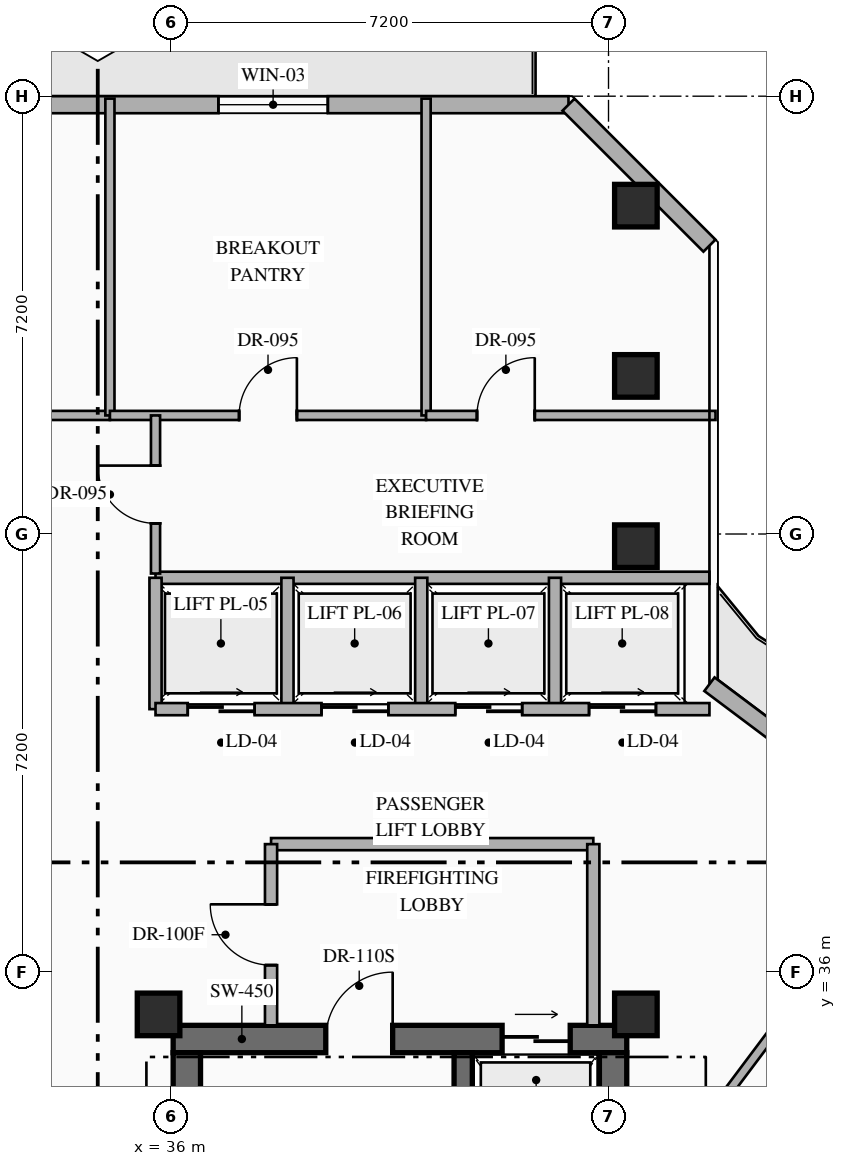
"""IFC4 building model, lengths in metres.
Left out: names, types, materials, properties, quantities, classifications, styles, units other than length and angle.
Written with IfcOpenShell. Run it as: python <this file> out.ifc"""

import sys

from ifc_helpers import new_model, si_unit, direction, frame, frame_2d, origin, origin_2d, place, context, subcontext, project, spatial, rectangle, hollow_rectangle, extrude, element, fill, save


model = new_model("IFC4")
c1 = context("Model", 3, precision=1e-05, world=origin(), true_north=direction((0.0, 1.0)))
c2 = subcontext(c1, "Body", "Model", "MODEL_VIEW")
j1 = project(units=[si_unit("LENGTHUNIT", "METRE"), si_unit("PLANEANGLEUNIT", "RADIAN")], contexts=[c1])
p1 = place(None, origin())
s1 = spatial("IfcSite", under=j1, at=p1, CompositionType="ELEMENT")
p2 = place(p1, origin())
s2 = spatial("IfcBuilding", under=s1, at=p2, CompositionType="ELEMENT")
p3 = place(p2, frame((0.0, 0.0, 223.95)))
s3 = spatial("IfcBuildingStorey", under=s2, at=p3, CompositionType="ELEMENT", Elevation=223.95)
p4 = place(p3, frame((36.04, 34.895, 0.0), z_axis=(0.0, 0.0, 1.0), x_axis=(1.0, 0.0, 0.0)))
e1 = element("IfcWall", 1, at=p4, inside=s3, PredefinedType="SHEAR", context=c2, shape_type="SweptSolid", body=[
    extrude(rectangle(XDim=7.46, YDim=0.45, at=frame_2d((3.73, 0.0))), origin(), (0.0, 0.0, 1.0), 3.6),
])
p5 = place(p4, frame((2.51, 0.0, 0.0)))
e2 = element("IfcOpeningElement", 2, at=p5, cuts=e1, PredefinedType="OPENING", context=c2, shape_type="SweptSolid", body=[
    extrude(rectangle(XDim=1.1, YDim=2.2, at=frame_2d((0.55, 1.1))), frame((0.0, 0.235, 0.0), z_axis=(0.0, -1.0, 0.0), x_axis=(1.0, 0.0, 0.0)), (0.0, 0.0, 1.0), 0.47),
])
p6 = place(p4, frame((5.41, 0.0, 0.0)))
e3 = element("IfcOpeningElement", 3, at=p6, cuts=e1, PredefinedType="OPENING", context=c2, shape_type="SweptSolid", body=[
    extrude(rectangle(XDim=1.12, YDim=2.15, at=frame_2d((0.56, 1.075))), frame((0.0, 0.235, 0.0), z_axis=(0.0, -1.0, 0.0), x_axis=(1.0, 0.0, 0.0)), (0.0, 0.0, 1.0), 0.47),
])
p7 = place(p3, frame((36.265, 25.19, 0.0), z_axis=(0.0, 0.0, 1.0), x_axis=(0.0, 1.0, 0.0)))
e4 = element("IfcWall", 4, at=p7, inside=s3, PredefinedType="SHEAR", context=c2, shape_type="SweptSolid", body=[
    extrude(rectangle(XDim=9.48, YDim=0.45, at=frame_2d((4.74, 0.0))), origin(), (0.0, 0.0, 1.0), 3.6),
])
p8 = place(p3, frame((43.275, 25.19, 0.0), z_axis=(0.0, 0.0, 1.0), x_axis=(0.0, 1.0, 0.0)))
e5 = element("IfcWall", 5, at=p8, inside=s3, PredefinedType="SHEAR", context=c2, shape_type="SweptSolid", body=[
    extrude(rectangle(XDim=9.48, YDim=0.45, at=frame_2d((4.74, 0.0))), origin(), (0.0, 0.0, 1.0), 3.6),
])
p9 = place(p8, frame((1.21, 0.0, 0.0)))
e6 = element("IfcOpeningElement", 6, at=p9, cuts=e5, PredefinedType="OPENING", context=c2, shape_type="SweptSolid", body=[
    extrude(rectangle(XDim=0.85, YDim=2.08, at=frame_2d((0.425, 1.04))), frame((0.0, 0.235, 0.0), z_axis=(0.0, -1.0, 0.0), x_axis=(1.0, 0.0, 0.0)), (0.0, 0.0, 1.0), 0.47),
])
p10 = place(p8, frame((4.46, 0.0, 0.0)))
e7 = element("IfcOpeningElement", 7, at=p10, cuts=e5, PredefinedType="OPENING", context=c2, shape_type="SweptSolid", body=[
    extrude(rectangle(XDim=0.85, YDim=2.08, at=frame_2d((0.425, 1.04))), frame((0.0, 0.235, 0.0), z_axis=(0.0, -1.0, 0.0), x_axis=(1.0, 0.0, 0.0)), (0.0, 0.0, 1.0), 0.47),
])
p11 = place(p3, frame((40.81, 25.19, 0.0), z_axis=(0.0, 0.0, 1.0), x_axis=(0.0, 1.0, 0.0)))
e8 = element("IfcWall", 8, at=p11, inside=s3, PredefinedType="SHEAR", context=c2, shape_type="SweptSolid", body=[
    extrude(rectangle(XDim=9.48, YDim=0.3, at=frame_2d((4.74, 0.0))), origin(), (0.0, 0.0, 1.0), 3.6),
])
for number, where, z_axis, x_axis in (
    (9, (35.8, 35.3, 0.0), (0.0, 0.0, 1.0), (1.0, 0.0, 0.0)),
    (10, (43.65, 35.3, 0.0), (0.0, 0.0, 1.0), (1.0, 0.0, 0.0)),
    (11, (43.65, 43.0, 0.0), (0.0, 0.0, 1.0), (1.0, 0.0, 0.0)),
    (12, (43.65, 45.8, 0.0), (0.0, 0.0, 1.0), (1.0, 0.0, 0.0)),
    (13, (43.65, 48.6, 0.0), (0.0, 0.0, 1.0), (1.0, 0.0, 0.0)),
):
    element("IfcColumn", number, at=place(p3, frame(where, z_axis=z_axis, x_axis=x_axis)), inside=s3, PredefinedType="COLUMN", context=c2, shape_type="SweptSolid", body=[
        extrude(hollow_rectangle(XDim=0.7, YDim=0.7, WallThickness=0.028, at=origin_2d()), origin(), (0.0, 0.0, 1.0), 3.6),
    ])
p12 = place(p3, frame((44.86, 40.73, 0.0), z_axis=(0.0, 0.0, 1.0), x_axis=(0.800007624502, -0.599989833863, 0.0)))
e14 = element("IfcWall", 14, at=p12, inside=s3, PredefinedType="STANDARD", context=c2, shape_type="SweptSolid", body=[
    extrude(rectangle(XDim=19.212, YDim=0.28, at=frame_2d((9.606, 0.0))), origin(), (0.0, 0.0, 1.0), 3.35),
])
p13 = place(p12, frame((1.755, 0.0, 0.0)))
e15 = element("IfcOpeningElement", 15, at=p13, cuts=e14, PredefinedType="OPENING", context=c2, shape_type="SweptSolid", body=[
    extrude(rectangle(XDim=1.1, YDim=2.2, at=frame_2d((0.55, 1.1))), frame((0.0, 0.15, 0.0), z_axis=(0.0, -1.0, 0.0), x_axis=(1.0, 0.0, 0.0)), (0.0, 0.0, 1.0), 0.3),
])
p14 = place(p12, frame((13.509, 0.0, 0.85)))
e16 = element("IfcOpeningElement", 16, at=p14, cuts=e14, PredefinedType="OPENING", context=c2, shape_type="SweptSolid", body=[
    extrude(rectangle(XDim=1.8, YDim=2.1, at=frame_2d((0.9, 1.05))), frame((0.0, 0.15, 0.0), z_axis=(0.0, -1.0, 0.0), x_axis=(1.0, 0.0, 0.0)), (0.0, 0.0, 1.0), 0.3),
])
p15 = place(p3, frame((20.458, 50.26, 0.0), z_axis=(0.0, 0.0, 1.0), x_axis=(1.0, 0.0, 0.0)))
e17 = element("IfcWall", 17, at=p15, inside=s3, PredefinedType="STANDARD", context=c2, shape_type="SweptSolid", body=[
    extrude(rectangle(XDim=22.084, YDim=0.28, at=frame_2d((11.042, 0.0))), origin(), (0.0, 0.0, 1.0), 3.35),
])
p16 = place(p15, frame((2.1, 0.0, 0.0)))
e18 = element("IfcOpeningElement", 18, at=p16, cuts=e17, PredefinedType="OPENING", context=c2, shape_type="SweptSolid", body=[
    extrude(rectangle(XDim=1.1, YDim=2.2, at=frame_2d((0.55, 1.1))), frame((0.0, 0.15, 0.0), z_axis=(0.0, -1.0, 0.0), x_axis=(1.0, 0.0, 0.0)), (0.0, 0.0, 1.0), 0.3),
])
p17 = place(p15, frame((16.326, 0.0, 0.85)))
e19 = element("IfcOpeningElement", 19, at=p17, cuts=e17, PredefinedType="OPENING", context=c2, shape_type="SweptSolid", body=[
    extrude(rectangle(XDim=1.8, YDim=2.1, at=frame_2d((0.9, 1.05))), frame((0.0, 0.15, 0.0), z_axis=(0.0, -1.0, 0.0), x_axis=(1.0, 0.0, 0.0)), (0.0, 0.0, 1.0), 0.3),
])
p18 = place(p3, frame((42.542, 50.26, 0.0), z_axis=(0.0, 0.0, 1.0), x_axis=(0.707106781187, -0.707106781187, 0.0)))
e20 = element("IfcWall", 20, at=p18, inside=s3, PredefinedType="STANDARD", context=c2, shape_type="SweptSolid", body=[
    extrude(rectangle(XDim=3.278, YDim=0.28, at=frame_2d((1.639, 0.0))), origin(), (0.0, 0.0, 1.0), 3.35),
])
p19 = place(p3, frame((37.65, 38.1, 0.0), z_axis=(0.0, 0.0, 1.0), x_axis=(1.0, 0.0, 0.0)))
e21 = element("IfcWall", 21, at=p19, inside=s3, PredefinedType="STANDARD", context=c2, shape_type="SweptSolid", body=[
    extrude(rectangle(XDim=5.3, YDim=0.2, at=frame_2d((2.65, 0.0))), origin(), (0.0, 0.0, 1.0), 3.35),
])
p20 = place(p3, frame((42.95, 35.12, 0.0), z_axis=(0.0, 0.0, 1.0), x_axis=(0.0, 1.0, 0.0)))
e22 = element("IfcWall", 22, at=p20, inside=s3, PredefinedType="STANDARD", context=c2, shape_type="SweptSolid", body=[
    extrude(rectangle(XDim=2.98, YDim=0.2, at=frame_2d((1.49, 0.0))), origin(), (0.0, 0.0, 1.0), 3.35),
])
p21 = place(p3, frame((37.65, 35.12, 0.0), z_axis=(0.0, 0.0, 1.0), x_axis=(0.0, 1.0, 0.0)))
e23 = element("IfcWall", 23, at=p21, inside=s3, PredefinedType="STANDARD", context=c2, shape_type="SweptSolid", body=[
    extrude(rectangle(XDim=2.98, YDim=0.2, at=frame_2d((1.49, 0.0))), origin(), (0.0, 0.0, 1.0), 3.35),
])
p22 = place(p21, frame((0.99, 0.0, 0.0)))
e24 = element("IfcOpeningElement", 24, at=p22, cuts=e23, PredefinedType="OPENING", context=c2, shape_type="SweptSolid", body=[
    extrude(rectangle(XDim=1.0, YDim=2.2, at=frame_2d((0.5, 1.1))), frame((0.0, 0.11, 0.0), z_axis=(0.0, -1.0, 0.0), x_axis=(1.0, 0.0, 0.0)), (0.0, 0.0, 1.0), 0.22),
])
p23 = place(p3, frame((35.75, 42.48, 0.0), z_axis=(0.0, 0.0, 1.0), x_axis=(1.0, 0.0, 0.0)))
e25 = element("IfcWall", 25, at=p23, inside=s3, PredefinedType="STANDARD", context=c2, shape_type="SweptSolid", body=[
    extrude(rectangle(XDim=9.11, YDim=0.2, at=frame_2d((4.555, 0.0))), origin(), (0.0, 0.0, 1.0), 3.35),
])
for number, where, z_axis, x_axis in (
    (26, (35.75, 40.32, 0.0), (0.0, 0.0, 1.0), (0.0, 1.0, 0.0)),
    (27, (37.92, 40.32, 0.0), (0.0, 0.0, 1.0), (0.0, 1.0, 0.0)),
    (28, (40.12, 40.32, 0.0), (0.0, 0.0, 1.0), (0.0, 1.0, 0.0)),
    (29, (42.32, 40.32, 0.0), (0.0, 0.0, 1.0), (0.0, 1.0, 0.0)),
):
    element("IfcWall", number, at=place(p3, frame(where, z_axis=z_axis, x_axis=x_axis)), inside=s3, PredefinedType="STANDARD", context=c2, shape_type="SweptSolid", body=[
        extrude(rectangle(XDim=2.16, YDim=0.2, at=frame_2d((1.08, 0.0))), origin(), (0.0, 0.0, 1.0), 3.35),
    ])
p24 = place(p3, frame((35.75, 40.32, 0.0), z_axis=(0.0, 0.0, 1.0), x_axis=(1.0, 0.0, 0.0)))
e30 = element("IfcWall", 30, at=p24, inside=s3, PredefinedType="STANDARD", context=c2, shape_type="SweptSolid", body=[
    extrude(rectangle(XDim=9.11, YDim=0.2, at=frame_2d((4.555, 0.0))), origin(), (0.0, 0.0, 1.0), 3.35),
])
p25 = place(p24, frame((0.53, 0.0, 0.0)))
e31 = element("IfcOpeningElement", 31, at=p25, cuts=e30, PredefinedType="OPENING", context=c2, shape_type="SweptSolid", body=[
    extrude(rectangle(XDim=1.1, YDim=2.18, at=frame_2d((0.55, 1.09))), frame((0.0, 0.11, 0.0), z_axis=(0.0, -1.0, 0.0), x_axis=(1.0, 0.0, 0.0)), (0.0, 0.0, 1.0), 0.22),
])
p26 = place(p24, frame((2.73, 0.0, 0.0)))
e32 = element("IfcOpeningElement", 32, at=p26, cuts=e30, PredefinedType="OPENING", context=c2, shape_type="SweptSolid", body=[
    extrude(rectangle(XDim=1.1, YDim=2.18, at=frame_2d((0.55, 1.09))), frame((0.0, 0.11, 0.0), z_axis=(0.0, -1.0, 0.0), x_axis=(1.0, 0.0, 0.0)), (0.0, 0.0, 1.0), 0.22),
])
p27 = place(p24, frame((4.93, 0.0, 0.0)))
e33 = element("IfcOpeningElement", 33, at=p27, cuts=e30, PredefinedType="OPENING", context=c2, shape_type="SweptSolid", body=[
    extrude(rectangle(XDim=1.1, YDim=2.18, at=frame_2d((0.55, 1.09))), frame((0.0, 0.11, 0.0), z_axis=(0.0, -1.0, 0.0), x_axis=(1.0, 0.0, 0.0)), (0.0, 0.0, 1.0), 0.22),
])
p28 = place(p24, frame((7.13, 0.0, 0.0)))
e34 = element("IfcOpeningElement", 34, at=p28, cuts=e30, PredefinedType="OPENING", context=c2, shape_type="SweptSolid", body=[
    extrude(rectangle(XDim=1.1, YDim=2.18, at=frame_2d((0.55, 1.09))), frame((0.0, 0.11, 0.0), z_axis=(0.0, -1.0, 0.0), x_axis=(1.0, 0.0, 0.0)), (0.0, 0.0, 1.0), 0.22),
])
p29 = place(p3, frame((29.6, 45.15, 0.0), z_axis=(0.0, 0.0, 1.0), x_axis=(1.0, 0.0, 0.0)))
e35 = element("IfcWall", 35, at=p29, inside=s3, PredefinedType="PARTITIONING", context=c2, shape_type="SweptSolid", body=[
    extrude(rectangle(XDim=5.4, YDim=0.15, at=frame_2d((2.7, 0.0))), origin(), (0.0, 0.0, 1.0), 3.35),
])
p30 = place(p29, frame((1.118, 0.0, 0.0)))
e36 = element("IfcOpeningElement", 36, at=p30, cuts=e35, PredefinedType="OPENING", context=c2, shape_type="SweptSolid", body=[
    extrude(rectangle(XDim=0.95, YDim=2.15, at=frame_2d((0.475, 1.075))), frame((0.0, 0.085, 0.0), z_axis=(0.0, -1.0, 0.0), x_axis=(1.0, 0.0, 0.0)), (0.0, 0.0, 1.0), 0.17),
])
p31 = place(p3, frame((35.0, 45.15, 0.0), z_axis=(0.0, 0.0, 1.0), x_axis=(0.0, 1.0, 0.0)))
e37 = element("IfcWall", 37, at=p31, inside=s3, PredefinedType="PARTITIONING", context=c2, shape_type="SweptSolid", body=[
    extrude(rectangle(XDim=5.21, YDim=0.15, at=frame_2d((2.605, 0.0))), origin(), (0.0, 0.0, 1.0), 3.35),
])
p32 = place(p3, frame((35.0, 45.15, 0.0), z_axis=(0.0, 0.0, 1.0), x_axis=(1.0, 0.0, 0.0)))
e38 = element("IfcWall", 38, at=p32, inside=s3, PredefinedType="PARTITIONING", context=c2, shape_type="SweptSolid", body=[
    extrude(rectangle(XDim=5.2, YDim=0.15, at=frame_2d((2.6, 0.0))), origin(), (0.0, 0.0, 1.0), 3.35),
])
p33 = place(p32, frame((2.125, 0.0, 0.0)))
e39 = element("IfcOpeningElement", 39, at=p33, cuts=e38, PredefinedType="OPENING", context=c2, shape_type="SweptSolid", body=[
    extrude(rectangle(XDim=0.95, YDim=2.15, at=frame_2d((0.475, 1.075))), frame((0.0, 0.085, 0.0), z_axis=(0.0, -1.0, 0.0), x_axis=(1.0, 0.0, 0.0)), (0.0, 0.0, 1.0), 0.17),
])
p34 = place(p3, frame((40.2, 45.15, 0.0), z_axis=(0.0, 0.0, 1.0), x_axis=(0.0, 1.0, 0.0)))
e40 = element("IfcWall", 40, at=p34, inside=s3, PredefinedType="PARTITIONING", context=c2, shape_type="SweptSolid", body=[
    extrude(rectangle(XDim=5.21, YDim=0.15, at=frame_2d((2.605, 0.0))), origin(), (0.0, 0.0, 1.0), 3.35),
])
p35 = place(p3, frame((40.2, 45.15, 0.0), z_axis=(0.0, 0.0, 1.0), x_axis=(1.0, 0.0, 0.0)))
e41 = element("IfcWall", 41, at=p35, inside=s3, PredefinedType="PARTITIONING", context=c2, shape_type="SweptSolid", body=[
    extrude(rectangle(XDim=4.76, YDim=0.15, at=frame_2d((2.38, 0.0))), origin(), (0.0, 0.0, 1.0), 3.35),
])
p36 = place(p35, frame((0.837, 0.0, 0.0)))
e42 = element("IfcOpeningElement", 42, at=p36, cuts=e41, PredefinedType="OPENING", context=c2, shape_type="SweptSolid", body=[
    extrude(rectangle(XDim=0.95, YDim=2.15, at=frame_2d((0.475, 1.075))), frame((0.0, 0.085, 0.0), z_axis=(0.0, -1.0, 0.0), x_axis=(1.0, 0.0, 0.0)), (0.0, 0.0, 1.0), 0.17),
])
p37 = place(p3, frame((43.48, 31.773, 0.0), z_axis=(0.0, 0.0, 1.0), x_axis=(0.599971041729, 0.800021717885, 0.0)))
e43 = element("IfcWall", 43, at=p37, inside=s3, PredefinedType="PARTITIONING", context=c2, shape_type="SweptSolid", body=[
    extrude(rectangle(XDim=8.094, YDim=0.15, at=frame_2d((4.047, 0.0))), origin(), (0.0, 0.0, 1.0), 3.35),
])
p38 = place(p3, frame((35.75, 42.55, 0.0), z_axis=(0.0, 0.0, 1.0), x_axis=(0.0, 1.0, 0.0)))
e44 = element("IfcWall", 44, at=p38, inside=s3, PredefinedType="PARTITIONING", context=c2, shape_type="SweptSolid", body=[
    extrude(rectangle(XDim=2.6, YDim=0.15, at=frame_2d((1.3, 0.0))), origin(), (0.0, 0.0, 1.0), 3.35),
])
p39 = place(p38, frame((0.825, 0.0, 0.0)))
e45 = element("IfcOpeningElement", 45, at=p39, cuts=e44, PredefinedType="OPENING", context=c2, shape_type="SweptSolid", body=[
    extrude(rectangle(XDim=0.95, YDim=2.15, at=frame_2d((0.475, 1.075))), frame((0.0, 0.085, 0.0), z_axis=(0.0, -1.0, 0.0), x_axis=(1.0, 0.0, 0.0)), (0.0, 0.0, 1.0), 0.17),
])
p40 = place(p17, origin())
e46 = element("IfcWindow", 46, at=p40, inside=s3, PartitioningType="SINGLE_PANEL", PredefinedType="WINDOW", context=c2, shape_type="SweptSolid", body=[
    extrude(rectangle(XDim=1.8, YDim=2.1, at=frame_2d((0.9, 1.05))), frame((0.0, 0.03, 0.0), z_axis=(0.0, -1.0, 0.0), x_axis=(1.0, 0.0, 0.0)), (0.0, 0.0, 1.0), 0.06),
])
fill(e19, e46)
p41 = place(p5, origin())
e47 = element("IfcDoor", 47, at=p41, inside=s3, OperationType="SINGLE_SWING_RIGHT", PredefinedType="DOOR", context=c2, shape_type="SweptSolid", body=[
    extrude(rectangle(XDim=1.1, YDim=2.2, at=frame_2d((0.55, 1.1))), frame((0.0, 0.025, 0.0), z_axis=(0.0, -1.0, 0.0), x_axis=(1.0, 0.0, 0.0)), (0.0, 0.0, 1.0), 0.05),
])
fill(e2, e47)
p42 = place(p6, origin())
e48 = element("IfcDoor", 48, at=p42, inside=s3, OperationType="SLIDING_TO_RIGHT", PredefinedType="USERDEFINED", context=c2, shape_type="SweptSolid", body=[
    extrude(rectangle(XDim=1.12, YDim=2.15, at=frame_2d((0.56, 1.075))), frame((0.0, 0.025, 0.0), z_axis=(0.0, -1.0, 0.0), x_axis=(1.0, 0.0, 0.0)), (0.0, 0.0, 1.0), 0.05),
])
fill(e3, e48)
p43 = place(p22, origin())
e49 = element("IfcDoor", 49, at=p43, inside=s3, OperationType="SINGLE_SWING_RIGHT", PredefinedType="DOOR", context=c2, shape_type="SweptSolid", body=[
    extrude(rectangle(XDim=1.0, YDim=2.2, at=frame_2d((0.5, 1.1))), frame((0.0, 0.025, 0.0), z_axis=(0.0, -1.0, 0.0), x_axis=(1.0, 0.0, 0.0)), (0.0, 0.0, 1.0), 0.05),
])
fill(e24, e49)
p44 = place(p25, origin())
e50 = element("IfcDoor", 50, at=p44, inside=s3, OperationType="SLIDING_TO_RIGHT", PredefinedType="USERDEFINED", context=c2, shape_type="SweptSolid", body=[
    extrude(rectangle(XDim=1.1, YDim=2.18, at=frame_2d((0.55, 1.09))), frame((0.0, 0.025, 0.0), z_axis=(0.0, -1.0, 0.0), x_axis=(1.0, 0.0, 0.0)), (0.0, 0.0, 1.0), 0.05),
])
fill(e31, e50)
p45 = place(p26, origin())
e51 = element("IfcDoor", 51, at=p45, inside=s3, OperationType="SLIDING_TO_RIGHT", PredefinedType="USERDEFINED", context=c2, shape_type="SweptSolid", body=[
    extrude(rectangle(XDim=1.1, YDim=2.18, at=frame_2d((0.55, 1.09))), frame((0.0, 0.025, 0.0), z_axis=(0.0, -1.0, 0.0), x_axis=(1.0, 0.0, 0.0)), (0.0, 0.0, 1.0), 0.05),
])
fill(e32, e51)
p46 = place(p27, origin())
e52 = element("IfcDoor", 52, at=p46, inside=s3, OperationType="SLIDING_TO_RIGHT", PredefinedType="USERDEFINED", context=c2, shape_type="SweptSolid", body=[
    extrude(rectangle(XDim=1.1, YDim=2.18, at=frame_2d((0.55, 1.09))), frame((0.0, 0.025, 0.0), z_axis=(0.0, -1.0, 0.0), x_axis=(1.0, 0.0, 0.0)), (0.0, 0.0, 1.0), 0.05),
])
fill(e33, e52)
p47 = place(p28, origin())
e53 = element("IfcDoor", 53, at=p47, inside=s3, OperationType="SLIDING_TO_RIGHT", PredefinedType="USERDEFINED", context=c2, shape_type="SweptSolid", body=[
    extrude(rectangle(XDim=1.1, YDim=2.18, at=frame_2d((0.55, 1.09))), frame((0.0, 0.025, 0.0), z_axis=(0.0, -1.0, 0.0), x_axis=(1.0, 0.0, 0.0)), (0.0, 0.0, 1.0), 0.05),
])
fill(e34, e53)
p48 = place(p33, origin())
e54 = element("IfcDoor", 54, at=p48, inside=s3, OperationType="SINGLE_SWING_RIGHT", PredefinedType="DOOR", context=c2, shape_type="SweptSolid", body=[
    extrude(rectangle(XDim=0.95, YDim=2.15, at=frame_2d((0.475, 1.075))), frame((0.0, 0.025, 0.0), z_axis=(0.0, -1.0, 0.0), x_axis=(1.0, 0.0, 0.0)), (0.0, 0.0, 1.0), 0.05),
])
fill(e39, e54)
p49 = place(p36, origin())
e55 = element("IfcDoor", 55, at=p49, inside=s3, OperationType="SINGLE_SWING_RIGHT", PredefinedType="DOOR", context=c2, shape_type="SweptSolid", body=[
    extrude(rectangle(XDim=0.95, YDim=2.15, at=frame_2d((0.475, 1.075))), frame((0.0, 0.025, 0.0), z_axis=(0.0, -1.0, 0.0), x_axis=(1.0, 0.0, 0.0)), (0.0, 0.0, 1.0), 0.05),
])
fill(e42, e55)
p50 = place(p39, origin())
e56 = element("IfcDoor", 56, at=p50, inside=s3, OperationType="SINGLE_SWING_RIGHT", PredefinedType="DOOR", context=c2, shape_type="SweptSolid", body=[
    extrude(rectangle(XDim=0.95, YDim=2.15, at=frame_2d((0.475, 1.075))), frame((0.0, 0.025, 0.0), z_axis=(0.0, -1.0, 0.0), x_axis=(1.0, 0.0, 0.0)), (0.0, 0.0, 1.0), 0.05),
])
fill(e45, e56)
save(model, sys.argv[1])
